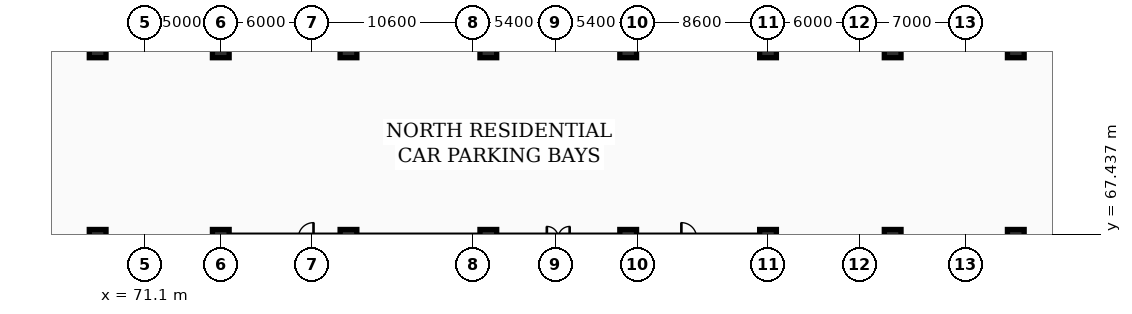
"""IFC4 building model, lengths in metres.
Left out: names, types, materials, properties, quantities, classifications, styles, units other than length and angle.
Written with IfcOpenShell. Run it as: python <this file> out.ifc"""

import sys

from ifc_helpers import new_model, si_unit, direction, frame, origin, origin_2d, place, context, subcontext, project, spatial, rectangle, extrude, element, save


model = new_model("IFC4")
c1 = context("Model", 3, precision=1e-05, world=origin(), true_north=direction((0.0, 1.0)))
c2 = subcontext(c1, "Body", "Model", "MODEL_VIEW")
j1 = project(units=[si_unit("LENGTHUNIT", "METRE"), si_unit("PLANEANGLEUNIT", "RADIAN")], contexts=[c1])
p1 = place(None, origin())
s1 = spatial("IfcSite", under=j1, at=p1, CompositionType="ELEMENT")
p2 = place(p1, origin())
s2 = spatial("IfcBuilding", under=s1, at=p2, CompositionType="ELEMENT")
p3 = place(p2, frame((0.0, 0.0, -10.8)))
s3 = spatial("IfcBuildingStorey", under=s2, at=p3, CompositionType="ELEMENT", Elevation=-10.8)
for number, where, z_axis, x_axis in (
    (1, (68.0, 67.2, -0.45), (0.0, 0.0, 1.0), (1.0, 0.0, 0.0)),
    (2, (68.0, 79.6, -0.45), (0.0, 0.0, 1.0), (1.0, 0.0, 0.0)),
    (3, (76.1, 67.2, -0.45), (0.0, 0.0, 1.0), (1.0, 0.0, 0.0)),
    (4, (76.1, 79.6, -0.45), (0.0, 0.0, 1.0), (1.0, 0.0, 0.0)),
    (5, (84.5, 67.2, -0.45), (0.0, 0.0, 1.0), (1.0, 0.0, 0.0)),
    (6, (84.5, 79.6, -0.45), (0.0, 0.0, 1.0), (1.0, 0.0, 0.0)),
    (7, (93.7, 67.2, -0.45), (0.0, 0.0, 1.0), (1.0, 0.0, 0.0)),
    (8, (93.7, 79.6, -0.45), (0.0, 0.0, 1.0), (1.0, 0.0, 0.0)),
    (9, (102.9, 67.2, -0.45), (0.0, 0.0, 1.0), (1.0, 0.0, 0.0)),
    (10, (102.9, 79.6, -0.45), (0.0, 0.0, 1.0), (1.0, 0.0, 0.0)),
    (11, (112.1, 67.2, -0.45), (0.0, 0.0, 1.0), (1.0, 0.0, 0.0)),
    (12, (112.1, 79.6, -0.45), (0.0, 0.0, 1.0), (1.0, 0.0, 0.0)),
    (13, (120.3, 67.2, -0.45), (0.0, 0.0, 1.0), (1.0, 0.0, 0.0)),
    (14, (120.3, 79.6, -0.45), (0.0, 0.0, 1.0), (1.0, 0.0, 0.0)),
    (15, (128.4, 67.2, -0.45), (0.0, 0.0, 1.0), (1.0, 0.0, 0.0)),
    (16, (128.4, 79.6, -0.45), (0.0, 0.0, 1.0), (1.0, 0.0, 0.0)),
):
    element("IfcColumn", number, at=place(p3, frame(where, z_axis=z_axis, x_axis=x_axis)), inside=s3, PredefinedType="COLUMN", context=c2, shape_type="SweptSolid", body=[
        extrude(rectangle(XDim=1.1, YDim=1.1, at=origin_2d()), origin(), (0.0, 0.0, 1.0), 4.05),
    ])
save(model, sys.argv[1])
